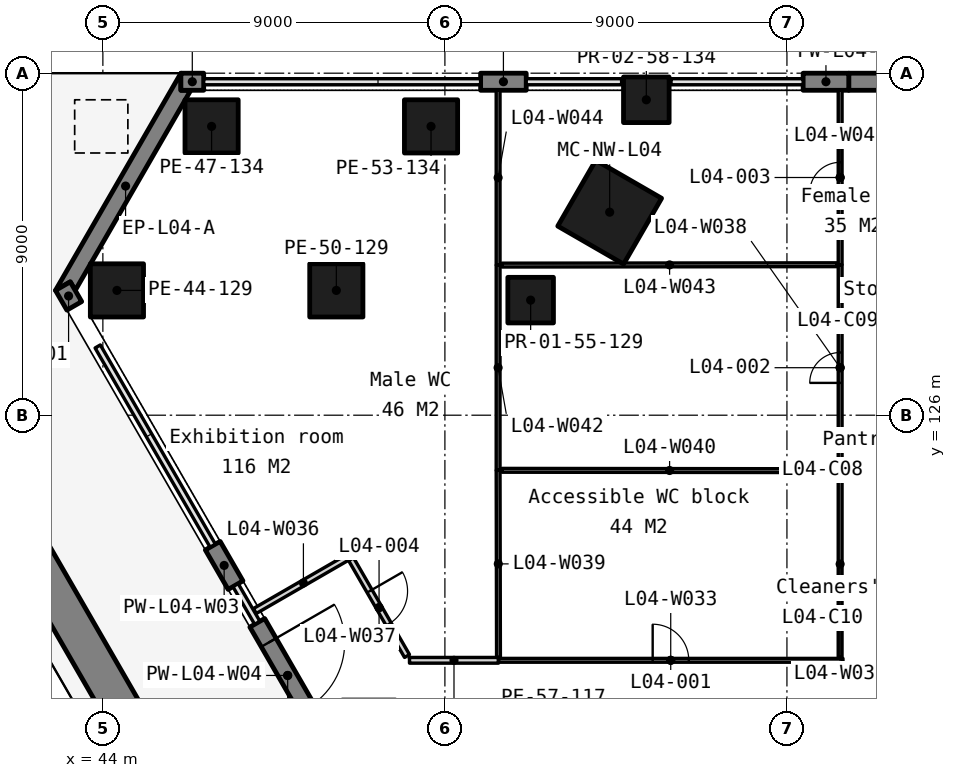
"""IFC4 building model, lengths in metres.
Left out: names, types, materials, properties, quantities, classifications, styles, units other than length and angle.
Written with IfcOpenShell. Run it as: python <this file> out.ifc"""

import sys

from ifc_helpers import new_model, si_unit, direction, frame, frame_2d, origin, origin_2d, place, context, subcontext, project, spatial, polyline, rectangle, outline, extrude, element, fill, save


model = new_model("IFC4")
c1 = context("Model", 3, precision=1e-05, world=origin(), true_north=direction((0.0, 1.0)))
c2 = subcontext(c1, "Body", "Model", "MODEL_VIEW")
j1 = project(units=[si_unit("LENGTHUNIT", "METRE"), si_unit("PLANEANGLEUNIT", "RADIAN")], contexts=[c1])
p1 = place(None, origin())
s1 = spatial("IfcSite", under=j1, at=p1, CompositionType="ELEMENT")
p2 = place(p1, origin())
s2 = spatial("IfcBuilding", under=s1, at=p2, CompositionType="ELEMENT")
p3 = place(p2, frame((0.0, 0.0, 25.0)))
s3 = spatial("IfcBuildingStorey", under=s2, at=p3, CompositionType="ELEMENT", Elevation=25.0)
for number, where, z_axis, x_axis in (
    (1, (44.37, 129.284, 0.0), (0.0, 0.0, 1.0), (1.0, 0.0, 0.0)),
    (2, (46.861, 133.6, 0.0), (0.0, 0.0, 1.0), (1.0, 0.0, 0.0)),
    (3, (50.143, 129.284, 0.0), (0.0, 0.0, 1.0), (1.0, 0.0, 0.0)),
    (4, (52.635, 133.6, 0.0), (0.0, 0.0, 1.0), (1.0, 0.0, 0.0)),
):
    element("IfcColumn", number, at=place(p3, frame(where, z_axis=z_axis, x_axis=x_axis)), inside=s3, PredefinedType="COLUMN", context=c2, shape_type="SweptSolid", body=[
        extrude(rectangle(XDim=1.4, YDim=1.4, at=origin_2d()), origin(), (0.0, 0.0, 1.0), 5.0),
    ])
for number, where, z_axis, x_axis in (
    (5, (55.256, 129.028, 0.0), (0.0, 0.0, 1.0), (1.0, 0.0, 0.0)),
    (6, (58.3, 134.3, 0.0), (0.0, 0.0, 1.0), (1.0, 0.0, 0.0)),
):
    element("IfcColumn", number, at=place(p3, frame(where, z_axis=z_axis, x_axis=x_axis)), inside=s3, PredefinedType="COLUMN", context=c2, shape_type="SweptSolid", body=[
        extrude(rectangle(XDim=1.2, YDim=1.2, at=origin_2d()), origin(), (0.0, 0.0, 1.0), 5.0),
    ])
p4 = place(p3, frame((57.336, 131.342, 0.0), z_axis=(0.0, 0.0, 1.0), x_axis=(-0.5, -0.866025403784, 0.0)))
e7 = element("IfcColumn", 7, at=p4, inside=s3, PredefinedType="COLUMN", context=c2, shape_type="SweptSolid", body=[
    extrude(rectangle(XDim=2.0, YDim=2.0, at=origin_2d()), origin(), (0.0, 0.0, 1.0), 5.0),
])
p5 = place(p3, frame((0.0, 0.0, -0.25)))
e8 = element("IfcWall", 8, at=p5, inside=s3, PredefinedType="SOLIDWALL", context=c2, shape_type="SweptSolid", body=[
    extrude(outline(polyline([(46.053, 135.0), (46.053, 134.55), (46.313, 134.55), (43.273, 129.284), (43.143, 129.509), (42.753, 129.284), (46.053, 135.0)])), origin(), (0.0, 0.0, 1.0), 4.262),
])
p6 = place(p3, frame((70.913, 134.775, -0.25), z_axis=(0.0, 0.0, 1.0), x_axis=(-1.0, 0.0, 0.0)))
e9 = element("IfcWall", 9, at=p6, inside=s3, PredefinedType="SOLIDWALL", context=c2, shape_type="SweptSolid", body=[
    extrude(rectangle(XDim=7.287, YDim=0.45, at=frame_2d((3.644, 0.0))), origin(), (0.0, 0.0, 1.0), 4.262),
])
for number, where, z_axis, x_axis in (
    (10, (63.626, 134.775, -0.25), (0.0, 0.0, 1.0), (-1.0, 0.0, 0.0)),
    (11, (55.14, 134.775, -0.25), (0.0, 0.0, 1.0), (-1.0, 0.0, 0.0)),
):
    element("IfcWall", number, at=place(p3, frame(where, z_axis=z_axis, x_axis=x_axis)), inside=s3, PredefinedType="SOLIDWALL", context=c2, shape_type="SweptSolid", body=[
        extrude(rectangle(XDim=1.2, YDim=0.45, at=frame_2d((0.6, 0.0))), origin(), (0.0, 0.0, 1.0), 4.262),
    ])
p7 = place(p3, frame((46.653, 134.775, -0.25), z_axis=(0.0, 0.0, 1.0), x_axis=(-1.0, 0.0, 0.0)))
e12 = element("IfcWall", 12, at=p7, inside=s3, PredefinedType="SOLIDWALL", context=c2, shape_type="SweptSolid", body=[
    extrude(rectangle(XDim=0.6, YDim=0.45, at=frame_2d((0.3, 0.0))), origin(), (0.0, 0.0, 1.0), 4.262),
])
p8 = place(p3, frame((42.948, 129.397, -0.25), z_axis=(0.0, 0.0, 1.0), x_axis=(0.50012165622, -0.865955154139, 0.0)))
e13 = element("IfcWall", 13, at=p8, inside=s3, PredefinedType="SOLIDWALL", context=c2, shape_type="SweptSolid", body=[
    extrude(rectangle(XDim=0.6, YDim=0.45, at=frame_2d((0.3, 0.0))), origin(), (0.0, 0.0, 1.0), 4.262),
])
p9 = place(p3, frame((46.891, 122.567, -0.25), z_axis=(0.0, 0.0, 1.0), x_axis=(0.500033551112, -0.866006032174, 0.0)))
e14 = element("IfcWall", 14, at=p9, inside=s3, PredefinedType="SOLIDWALL", context=c2, shape_type="SweptSolid", body=[
    extrude(rectangle(XDim=1.2, YDim=0.45, at=frame_2d((0.6, 0.0))), origin(), (0.0, 0.0, 1.0), 4.262),
])
p10 = place(p3, frame((48.063, 120.537, -0.25), z_axis=(0.0, 0.0, 1.0), x_axis=(0.499971222258, -0.866042017984, 0.0)))
e15 = element("IfcWall", 15, at=p10, inside=s3, PredefinedType="SOLIDWALL", context=c2, shape_type="SweptSolid", body=[
    extrude(rectangle(XDim=3.2, YDim=0.45, at=frame_2d((1.6, 0.0))), origin(), (0.0, 0.0, 1.0), 4.262),
])
p11 = place(p10, frame((0.6, 0.0, 0.25)))
e16 = element("IfcOpeningElement", 16, at=p11, cuts=e15, PredefinedType="OPENING", context=c2, shape_type="SweptSolid", body=[
    extrude(rectangle(XDim=2.0, YDim=2.4, at=frame_2d((1.0, 1.2))), frame((0.0, 0.235, 0.0), z_axis=(0.0, -1.0, 0.0), x_axis=(1.0, 0.0, 0.0)), (0.0, 0.0, 1.0), 0.47),
])
p12 = place(p3, frame((77.166, 61.679, 0.0), z_axis=(0.0, 0.0, 1.0), x_axis=(-0.500000102728, 0.866025344474, 0.0)))
e17 = element("IfcWall", 17, at=p12, inside=s3, PredefinedType="STANDARD", context=c2, shape_type="SweptSolid", body=[
    extrude(rectangle(XDim=77.841, YDim=1.0, at=frame_2d((38.92, 0.0))), origin(), (0.0, 0.0, 1.0), 0.6),
])
p13 = place(p3, frame((52.068, 119.55, 0.0), z_axis=(0.0, 0.0, 1.0), x_axis=(1.0, 0.0, 0.0)))
e18 = element("IfcWall", 18, at=p13, inside=s3, PredefinedType="PARTITIONING", context=c2, shape_type="SweptSolid", body=[
    extrude(rectangle(XDim=2.342, YDim=0.15, at=frame_2d((1.171, 0.0))), origin(), (0.0, 0.0, 1.0), 4.7),
])
p14 = place(p3, frame((54.41, 119.55, 0.0), z_axis=(0.0, 0.0, 1.0), x_axis=(1.0, 0.0, 0.0)))
e19 = element("IfcWall", 19, at=p14, inside=s3, PredefinedType="PARTITIONING", context=c2, shape_type="SweptSolid", body=[
    extrude(rectangle(XDim=9.064, YDim=0.1, at=frame_2d((4.532, 0.0))), origin(), (0.0, 0.0, 1.0), 4.7),
])
p15 = place(p14, frame((4.057, 0.0, 0.0)))
e20 = element("IfcOpeningElement", 20, at=p15, cuts=e19, PredefinedType="OPENING", context=c2, shape_type="SweptSolid", body=[
    extrude(rectangle(XDim=0.95, YDim=2.1, at=frame_2d((0.475, 1.05))), frame((0.0, 0.06, 0.0), z_axis=(0.0, -1.0, 0.0), x_axis=(1.0, 0.0, 0.0)), (0.0, 0.0, 1.0), 0.12),
])
p16 = place(p3, frame((63.399, 119.625, 0.0), z_axis=(0.0, 0.0, 1.0), x_axis=(9.9344327e-05, 0.999999995065, 0.0)))
e21 = element("IfcWall", 21, at=p16, inside=s3, PredefinedType="PARTITIONING", context=c2, shape_type="SweptSolid", body=[
    extrude(rectangle(XDim=4.915, YDim=0.1, at=frame_2d((2.458, 0.0))), origin(), (0.0, 0.0, 1.0), 4.7),
])
p17 = place(p3, frame((48.0, 120.847, 0.0), z_axis=(0.0, 0.0, 1.0), x_axis=(0.866003658127, 0.500037662692, 0.0)))
e22 = element("IfcWall", 22, at=p17, inside=s3, PredefinedType="PARTITIONING", context=c2, shape_type="SweptSolid", body=[
    extrude(rectangle(XDim=2.95, YDim=0.15, at=frame_2d((1.475, 0.0))), origin(), (0.0, 0.0, 1.0), 4.7),
])
p18 = place(p3, frame((50.532, 122.211, 0.0), z_axis=(0.0, 0.0, 1.0), x_axis=(0.50010066533, -0.865967276828, 0.0)))
e23 = element("IfcWall", 23, at=p18, inside=s3, PredefinedType="PARTITIONING", context=c2, shape_type="SweptSolid", body=[
    extrude(rectangle(XDim=2.943, YDim=0.15, at=frame_2d((1.471, 0.0))), origin(), (0.0, 0.0, 1.0), 4.7),
])
p19 = place(p18, frame((0.971, 0.0, 0.0)))
e24 = element("IfcOpeningElement", 24, at=p19, cuts=e23, PredefinedType="OPENING", context=c2, shape_type="SweptSolid", body=[
    extrude(rectangle(XDim=1.0, YDim=2.1, at=frame_2d((0.5, 1.05))), frame((0.0, 0.085, 0.0), z_axis=(0.0, -1.0, 0.0), x_axis=(1.0, 0.0, 0.0)), (0.0, 0.0, 1.0), 0.17),
])
p20 = place(p3, frame((63.4, 124.54, 0.0), z_axis=(0.0, 0.0, 1.0), x_axis=(0.0, 1.0, 0.0)))
e25 = element("IfcWall", 25, at=p20, inside=s3, PredefinedType="PARTITIONING", context=c2, shape_type="SweptSolid", body=[
    extrude(rectangle(XDim=5.42, YDim=0.1, at=frame_2d((2.71, 0.0))), origin(), (0.0, 0.0, 1.0), 4.7),
])
p21 = place(p20, frame((2.31, 0.0, 0.0)))
e26 = element("IfcOpeningElement", 26, at=p21, cuts=e25, PredefinedType="OPENING", context=c2, shape_type="SweptSolid", body=[
    extrude(rectangle(XDim=0.8, YDim=2.1, at=frame_2d((0.4, 1.05))), frame((0.0, 0.06, 0.0), z_axis=(0.0, -1.0, 0.0), x_axis=(1.0, 0.0, 0.0)), (0.0, 0.0, 1.0), 0.12),
])
p22 = place(p3, frame((54.41, 119.625, 0.0), z_axis=(0.0, 0.0, 1.0), x_axis=(-0.002032415373, 0.999997934642, 0.0)))
e27 = element("IfcWall", 27, at=p22, inside=s3, PredefinedType="PARTITIONING", context=c2, shape_type="SweptSolid", body=[
    extrude(rectangle(XDim=4.925, YDim=0.1, at=frame_2d((2.462, 0.0))), origin(), (0.0, 0.0, 1.0), 4.7),
])
p23 = place(p3, frame((54.5, 124.55, 0.0), z_axis=(0.0, 0.0, 1.0), x_axis=(0.999999387727, -0.001106591847, 0.0)))
e28 = element("IfcWall", 28, at=p23, inside=s3, PredefinedType="PARTITIONING", context=c2, shape_type="SweptSolid", body=[
    extrude(rectangle(XDim=8.825, YDim=0.1, at=frame_2d((4.413, 0.0))), origin(), (0.0, 0.0, 1.0), 4.7),
])
p24 = place(p3, frame((63.4, 129.96, 0.0), z_axis=(0.0, 0.0, 1.0), x_axis=(0.0, 1.0, 0.0)))
e29 = element("IfcWall", 29, at=p24, inside=s3, PredefinedType="PARTITIONING", context=c2, shape_type="SweptSolid", body=[
    extrude(rectangle(XDim=4.59, YDim=0.1, at=frame_2d((2.295, 0.0))), origin(), (0.0, 0.0, 1.0), 4.7),
])
p25 = place(p24, frame((1.895, 0.0, 0.0)))
e30 = element("IfcOpeningElement", 30, at=p25, cuts=e29, PredefinedType="OPENING", context=c2, shape_type="SweptSolid", body=[
    extrude(rectangle(XDim=0.8, YDim=2.1, at=frame_2d((0.4, 1.05))), frame((0.0, 0.06, 0.0), z_axis=(0.0, -1.0, 0.0), x_axis=(1.0, 0.0, 0.0)), (0.0, 0.0, 1.0), 0.12),
])
p26 = place(p3, frame((54.4, 124.55, 0.0), z_axis=(0.0, 0.0, 1.0), x_axis=(0.0, 1.0, 0.0)))
e31 = element("IfcWall", 31, at=p26, inside=s3, PredefinedType="PARTITIONING", context=c2, shape_type="SweptSolid", body=[
    extrude(rectangle(XDim=5.4, YDim=0.1, at=frame_2d((2.7, 0.0))), origin(), (0.0, 0.0, 1.0), 4.7),
])
p27 = place(p3, frame((54.5, 129.95, 0.0), z_axis=(0.0, 0.0, 1.0), x_axis=(0.999999387727, 0.001106591847, 0.0)))
e32 = element("IfcWall", 32, at=p27, inside=s3, PredefinedType="PARTITIONING", context=c2, shape_type="SweptSolid", body=[
    extrude(rectangle(XDim=8.825, YDim=0.1, at=frame_2d((4.413, 0.0))), origin(), (0.0, 0.0, 1.0), 4.7),
])
p28 = place(p3, frame((54.4, 129.95, 0.0), z_axis=(0.0, 0.0, 1.0), x_axis=(0.0, 1.0, 0.0)))
e33 = element("IfcWall", 33, at=p28, inside=s3, PredefinedType="PARTITIONING", context=c2, shape_type="SweptSolid", body=[
    extrude(rectangle(XDim=4.6, YDim=0.1, at=frame_2d((2.3, 0.0))), origin(), (0.0, 0.0, 1.0), 4.7),
])
p29 = place(p11, origin())
e34 = element("IfcDoor", 34, at=p29, inside=s3, OperationType="DOUBLE_DOOR_SINGLE_SWING", PredefinedType="DOOR", context=c2, shape_type="SweptSolid", body=[
    extrude(rectangle(XDim=2.0, YDim=2.4, at=frame_2d((1.0, 1.2))), frame((0.0, 0.025, 0.0), z_axis=(0.0, -1.0, 0.0), x_axis=(1.0, 0.0, 0.0)), (0.0, 0.0, 1.0), 0.05),
])
fill(e16, e34)
p30 = place(p15, origin())
e35 = element("IfcDoor", 35, at=p30, inside=s3, OperationType="SINGLE_SWING_LEFT", PredefinedType="DOOR", context=c2, shape_type="SweptSolid", body=[
    extrude(rectangle(XDim=0.95, YDim=2.1, at=frame_2d((0.475, 1.05))), frame((0.0, 0.025, 0.0), z_axis=(0.0, -1.0, 0.0), x_axis=(1.0, 0.0, 0.0)), (0.0, 0.0, 1.0), 0.05),
])
fill(e20, e35)
p31 = place(p21, origin())
e36 = element("IfcDoor", 36, at=p31, inside=s3, OperationType="SINGLE_SWING_LEFT", PredefinedType="DOOR", context=c2, shape_type="SweptSolid", body=[
    extrude(rectangle(XDim=0.8, YDim=2.1, at=frame_2d((0.4, 1.05))), frame((0.0, 0.025, 0.0), z_axis=(0.0, -1.0, 0.0), x_axis=(1.0, 0.0, 0.0)), (0.0, 0.0, 1.0), 0.05),
])
fill(e26, e36)
p32 = place(p25, origin())
e37 = element("IfcDoor", 37, at=p32, inside=s3, OperationType="SINGLE_SWING_LEFT", PredefinedType="DOOR", context=c2, shape_type="SweptSolid", body=[
    extrude(rectangle(XDim=0.8, YDim=2.1, at=frame_2d((0.4, 1.05))), frame((0.0, 0.025, 0.0), z_axis=(0.0, -1.0, 0.0), x_axis=(1.0, 0.0, 0.0)), (0.0, 0.0, 1.0), 0.05),
])
fill(e30, e37)
p33 = place(p19, origin())
e38 = element("IfcDoor", 38, at=p33, inside=s3, OperationType="SINGLE_SWING_LEFT", PredefinedType="DOOR", context=c2, shape_type="SweptSolid", body=[
    extrude(rectangle(XDim=1.0, YDim=2.1, at=frame_2d((0.5, 1.05))), frame((0.0, 0.025, 0.0), z_axis=(0.0, -1.0, 0.0), x_axis=(1.0, 0.0, 0.0)), (0.0, 0.0, 1.0), 0.05),
])
fill(e24, e38)
save(model, sys.argv[1])
